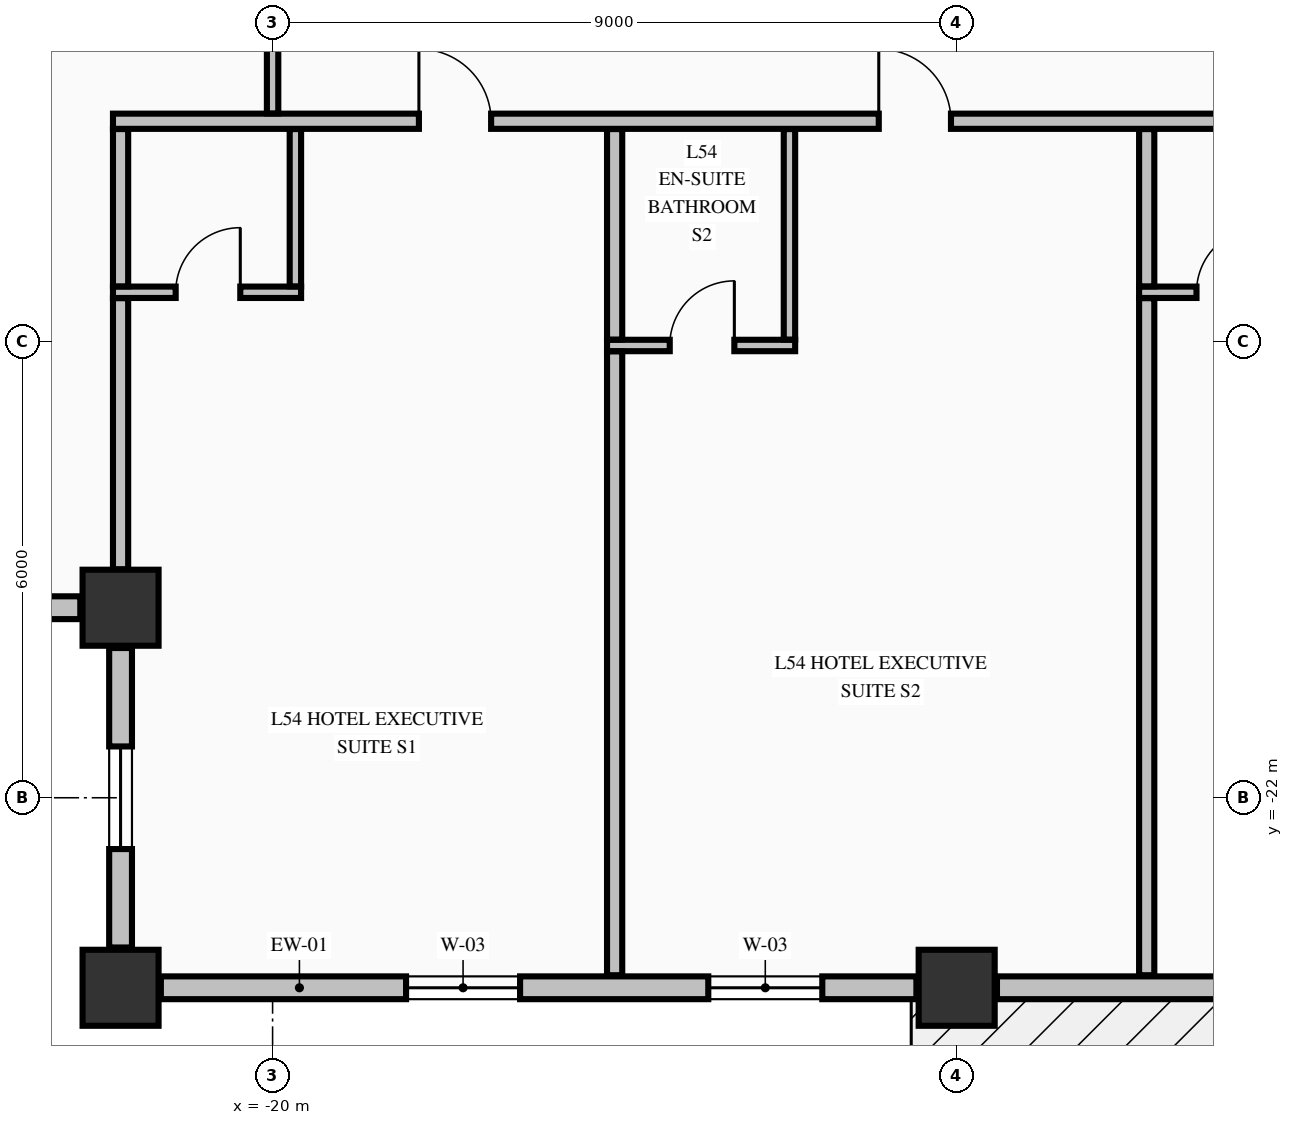
"""IFC4 building model, lengths in metres.
Left out: names, types, materials, properties, quantities, classifications, styles, units other than length and angle.
Written with IfcOpenShell. Run it as: python <this file> out.ifc"""

import sys

from ifc_helpers import new_model, si_unit, direction, frame, frame_2d, origin, origin_2d, place, context, subcontext, project, spatial, rectangle, extrude, element, fill, save


model = new_model("IFC4")
c1 = context("Model", 3, precision=1e-05, world=origin(), true_north=direction((0.0, 1.0)))
c2 = subcontext(c1, "Body", "Model", "MODEL_VIEW")
j1 = project(units=[si_unit("LENGTHUNIT", "METRE"), si_unit("PLANEANGLEUNIT", "RADIAN")], contexts=[c1])
p1 = place(None, origin())
s1 = spatial("IfcSite", under=j1, at=p1, CompositionType="ELEMENT")
p2 = place(p1, origin())
s2 = spatial("IfcBuilding", under=s1, at=p2, CompositionType="ELEMENT")
p3 = place(p2, frame((0.0, 0.0, 208.46)))
s3 = spatial("IfcBuildingStorey", under=s2, at=p3, CompositionType="ELEMENT", Elevation=208.46)
for number, where, z_axis, x_axis in (
    (1, (-22.0, -24.5, -0.25), (0.0, 0.0, 1.0), (1.0, 0.0, 0.0)),
    (2, (-11.0, -24.5, -0.25), (0.0, 0.0, 1.0), (1.0, 0.0, 0.0)),
    (3, (-22.0, -19.5, -0.25), (0.0, 0.0, 1.0), (1.0, 0.0, 0.0)),
):
    element("IfcColumn", number, at=place(p3, frame(where, z_axis=z_axis, x_axis=x_axis)), inside=s3, PredefinedType="COLUMN", context=c2, shape_type="SweptSolid", body=[
        extrude(rectangle(XDim=1.0, YDim=1.0, at=origin_2d()), origin(), (0.0, 0.0, 1.0), 3.325),
    ])
p4 = place(p3, frame((-26.47, -19.5, 0.0), z_axis=(0.0, 0.0, 1.0), x_axis=(1.0, 0.0, 0.0)))
e4 = element("IfcWall", 4, at=p4, inside=s3, PredefinedType="STANDARD", context=c2, shape_type="SweptSolid", body=[
    extrude(rectangle(XDim=3.94, YDim=0.3, at=frame_2d((1.97, 0.0))), origin(), (0.0, 0.0, 1.0), 2.467),
])
p5 = place(p4, frame((1.295, 0.0, 0.68)))
e5 = element("IfcOpeningElement", 5, at=p5, cuts=e4, PredefinedType="OPENING", context=c2, shape_type="SweptSolid", body=[
    extrude(rectangle(XDim=1.35, YDim=1.42, at=frame_2d((0.675, 0.71))), frame((0.0, 0.16, 0.0), z_axis=(0.0, -1.0, 0.0), x_axis=(1.0, 0.0, 0.0)), (0.0, 0.0, 1.0), 0.32),
])
p6 = place(p3, frame((-22.0, -20.03, 0.0), z_axis=(0.0, 0.0, 1.0), x_axis=(0.0, -1.0, 0.0)))
e6 = element("IfcWall", 6, at=p6, inside=s3, PredefinedType="STANDARD", context=c2, shape_type="SweptSolid", body=[
    extrude(rectangle(XDim=3.94, YDim=0.3, at=frame_2d((1.97, 0.0))), origin(), (0.0, 0.0, 1.0), 2.467),
])
p7 = place(p6, frame((1.295, 0.0, 0.68)))
e7 = element("IfcOpeningElement", 7, at=p7, cuts=e6, PredefinedType="OPENING", context=c2, shape_type="SweptSolid", body=[
    extrude(rectangle(XDim=1.35, YDim=1.42, at=frame_2d((0.675, 0.71))), frame((0.0, 0.16, 0.0), z_axis=(0.0, -1.0, 0.0), x_axis=(1.0, 0.0, 0.0)), (0.0, 0.0, 1.0), 0.32),
])
p8 = place(p3, frame((-21.47, -24.5, 0.0), z_axis=(0.0, 0.0, 1.0), x_axis=(1.0, 0.0, 0.0)))
e8 = element("IfcWall", 8, at=p8, inside=s3, PredefinedType="STANDARD", context=c2, shape_type="SweptSolid", body=[
    extrude(rectangle(XDim=9.94, YDim=0.3, at=frame_2d((4.97, 0.0))), origin(), (0.0, 0.0, 1.0), 2.467),
])
p9 = place(p8, frame((3.226, 0.0, 0.72)))
e9 = element("IfcOpeningElement", 9, at=p9, cuts=e8, PredefinedType="OPENING", context=c2, shape_type="SweptSolid", body=[
    extrude(rectangle(XDim=1.5, YDim=1.6, at=frame_2d((0.75, 0.8))), frame((0.0, 0.16, 0.0), z_axis=(0.0, -1.0, 0.0), x_axis=(1.0, 0.0, 0.0)), (0.0, 0.0, 1.0), 0.32),
])
p10 = place(p8, frame((7.202, 0.0, 0.72)))
e10 = element("IfcOpeningElement", 10, at=p10, cuts=e8, PredefinedType="OPENING", context=c2, shape_type="SweptSolid", body=[
    extrude(rectangle(XDim=1.5, YDim=1.6, at=frame_2d((0.75, 0.8))), frame((0.0, 0.16, 0.0), z_axis=(0.0, -1.0, 0.0), x_axis=(1.0, 0.0, 0.0)), (0.0, 0.0, 1.0), 0.32),
])
p11 = place(p3, frame((-10.47, -24.5, 0.0), z_axis=(0.0, 0.0, 1.0), x_axis=(1.0, 0.0, 0.0)))
e11 = element("IfcWall", 11, at=p11, inside=s3, PredefinedType="STANDARD", context=c2, shape_type="SweptSolid", body=[
    extrude(rectangle(XDim=9.94, YDim=0.3, at=frame_2d((4.97, 0.0))), origin(), (0.0, 0.0, 1.0), 2.467),
])
p12 = place(p11, frame((4.068, 0.0, 0.0)))
e12 = element("IfcOpeningElement", 12, at=p12, cuts=e11, PredefinedType="OPENING", context=c2, shape_type="SweptSolid", body=[
    extrude(rectangle(XDim=1.1, YDim=2.15, at=frame_2d((0.55, 1.075))), frame((0.0, 0.16, 0.0), z_axis=(0.0, -1.0, 0.0), x_axis=(1.0, 0.0, 0.0)), (0.0, 0.0, 1.0), 0.32),
])
p13 = place(p3, frame((-15.6, -16.05, 0.0), z_axis=(0.0, 0.0, 1.0), x_axis=(1.0, 0.0, 0.0)))
e13 = element("IfcWall", 13, at=p13, inside=s3, PredefinedType="PARTITIONING", context=c2, shape_type="SweptSolid", body=[
    extrude(rectangle(XDim=2.475, YDim=0.15, at=frame_2d((1.238, 0.0))), origin(), (0.0, 0.0, 1.0), 3.075),
])
p14 = place(p13, frame((0.825, 0.0, 0.0)))
e14 = element("IfcOpeningElement", 14, at=p14, cuts=e13, PredefinedType="OPENING", context=c2, shape_type="SweptSolid", body=[
    extrude(rectangle(XDim=0.85, YDim=2.1, at=frame_2d((0.425, 1.05))), frame((0.0, 0.085, 0.0), z_axis=(0.0, -1.0, 0.0), x_axis=(1.0, 0.0, 0.0)), (0.0, 0.0, 1.0), 0.17),
])
p15 = place(p3, frame((-22.1, -15.35, 0.0), z_axis=(0.0, 0.0, 1.0), x_axis=(1.0, 0.0, 0.0)))
e15 = element("IfcWall", 15, at=p15, inside=s3, PredefinedType="PARTITIONING", context=c2, shape_type="SweptSolid", body=[
    extrude(rectangle(XDim=2.475, YDim=0.15, at=frame_2d((1.238, 0.0))), origin(), (0.0, 0.0, 1.0), 3.075),
])
p16 = place(p15, frame((0.825, 0.0, 0.0)))
e16 = element("IfcOpeningElement", 16, at=p16, cuts=e15, PredefinedType="OPENING", context=c2, shape_type="SweptSolid", body=[
    extrude(rectangle(XDim=0.85, YDim=2.1, at=frame_2d((0.425, 1.05))), frame((0.0, 0.085, 0.0), z_axis=(0.0, -1.0, 0.0), x_axis=(1.0, 0.0, 0.0)), (0.0, 0.0, 1.0), 0.17),
])
p17 = place(p3, frame((-8.6, -15.35, 0.0), z_axis=(0.0, 0.0, 1.0), x_axis=(1.0, 0.0, 0.0)))
e17 = element("IfcWall", 17, at=p17, inside=s3, PredefinedType="PARTITIONING", context=c2, shape_type="SweptSolid", body=[
    extrude(rectangle(XDim=2.335, YDim=0.15, at=frame_2d((1.167, 0.0))), origin(), (0.0, 0.0, 1.0), 3.075),
])
p18 = place(p17, frame((0.755, 0.0, 0.0)))
e18 = element("IfcOpeningElement", 18, at=p18, cuts=e17, PredefinedType="OPENING", context=c2, shape_type="SweptSolid", body=[
    extrude(rectangle(XDim=0.85, YDim=2.1, at=frame_2d((0.425, 1.05))), frame((0.0, 0.085, 0.0), z_axis=(0.0, -1.0, 0.0), x_axis=(1.0, 0.0, 0.0)), (0.0, 0.0, 1.0), 0.17),
])
p19 = place(p3, frame((-22.1, -13.1, 0.0), z_axis=(0.0, 0.0, 1.0), x_axis=(1.0, 0.0, 0.0)))
e19 = element("IfcWall", 19, at=p19, inside=s3, PredefinedType="PARTITIONING", context=c2, shape_type="SweptSolid", body=[
    extrude(rectangle(XDim=39.2, YDim=0.2, at=frame_2d((19.6, 0.0))), origin(), (0.0, 0.0, 1.0), 3.075),
])
p20 = place(p19, frame((4.025, 0.0, 0.0)))
e20 = element("IfcOpeningElement", 20, at=p20, cuts=e19, PredefinedType="OPENING", context=c2, shape_type="SweptSolid", body=[
    extrude(rectangle(XDim=0.95, YDim=2.15, at=frame_2d((0.475, 1.075))), frame((0.0, 0.11, 0.0), z_axis=(0.0, -1.0, 0.0), x_axis=(1.0, 0.0, 0.0)), (0.0, 0.0, 1.0), 0.22),
])
p21 = place(p19, frame((10.075, 0.0, 0.0)))
e21 = element("IfcOpeningElement", 21, at=p21, cuts=e19, PredefinedType="OPENING", context=c2, shape_type="SweptSolid", body=[
    extrude(rectangle(XDim=0.95, YDim=2.15, at=frame_2d((0.475, 1.075))), frame((0.0, 0.11, 0.0), z_axis=(0.0, -1.0, 0.0), x_axis=(1.0, 0.0, 0.0)), (0.0, 0.0, 1.0), 0.22),
])
p22 = place(p19, frame((16.905, 0.0, 0.0)))
e22 = element("IfcOpeningElement", 22, at=p22, cuts=e19, PredefinedType="OPENING", context=c2, shape_type="SweptSolid", body=[
    extrude(rectangle(XDim=0.95, YDim=2.15, at=frame_2d((0.475, 1.075))), frame((0.0, 0.11, 0.0), z_axis=(0.0, -1.0, 0.0), x_axis=(1.0, 0.0, 0.0)), (0.0, 0.0, 1.0), 0.22),
])
p23 = place(p19, frame((22.475, 0.0, 0.0)))
e23 = element("IfcOpeningElement", 23, at=p23, cuts=e19, PredefinedType="OPENING", context=c2, shape_type="SweptSolid", body=[
    extrude(rectangle(XDim=0.95, YDim=2.15, at=frame_2d((0.475, 1.075))), frame((0.0, 0.11, 0.0), z_axis=(0.0, -1.0, 0.0), x_axis=(1.0, 0.0, 0.0)), (0.0, 0.0, 1.0), 0.22),
])
p24 = place(p19, frame((30.675, 0.0, 0.0)))
e24 = element("IfcOpeningElement", 24, at=p24, cuts=e19, PredefinedType="OPENING", context=c2, shape_type="SweptSolid", body=[
    extrude(rectangle(XDim=0.95, YDim=2.15, at=frame_2d((0.475, 1.075))), frame((0.0, 0.11, 0.0), z_axis=(0.0, -1.0, 0.0), x_axis=(1.0, 0.0, 0.0)), (0.0, 0.0, 1.0), 0.22),
])
p25 = place(p19, frame((36.325, 0.0, 0.0)))
e25 = element("IfcOpeningElement", 25, at=p25, cuts=e19, PredefinedType="OPENING", context=c2, shape_type="SweptSolid", body=[
    extrude(rectangle(XDim=1.05, YDim=2.15, at=frame_2d((0.525, 1.075))), frame((0.0, 0.11, 0.0), z_axis=(0.0, -1.0, 0.0), x_axis=(1.0, 0.0, 0.0)), (0.0, 0.0, 1.0), 0.22),
])
p26 = place(p3, frame((-22.0, -18.994, 0.0), z_axis=(0.0, 0.0, 1.0), x_axis=(0.0, 1.0, 0.0)))
e26 = element("IfcWall", 26, at=p26, inside=s3, PredefinedType="PARTITIONING", context=c2, shape_type="SweptSolid", body=[
    extrude(rectangle(XDim=3.566, YDim=0.2, at=frame_2d((1.783, 0.0))), origin(), (0.0, 0.0, 1.0), 3.075),
])
p27 = place(p3, frame((-22.0, -15.272, 0.0), z_axis=(0.0, 0.0, 1.0), x_axis=(0.0, 1.0, 0.0)))
e27 = element("IfcWall", 27, at=p27, inside=s3, PredefinedType="PARTITIONING", context=c2, shape_type="SweptSolid", body=[
    extrude(rectangle(XDim=2.069, YDim=0.2, at=frame_2d((1.035, 0.0))), origin(), (0.0, 0.0, 1.0), 3.075),
])
p28 = place(p3, frame((-20.0, -12.997, 0.0), z_axis=(0.0, 0.0, 1.0), x_axis=(0.0, 1.0, 0.0)))
e28 = element("IfcWall", 28, at=p28, inside=s3, PredefinedType="PARTITIONING", context=c2, shape_type="SweptSolid", body=[
    extrude(rectangle(XDim=2.616, YDim=0.15, at=frame_2d((1.308, 0.0))), origin(), (0.0, 0.0, 1.0), 2.267),
])
p29 = place(p3, frame((-19.7, -15.272, 0.0), z_axis=(0.0, 0.0, 1.0), x_axis=(0.0, 1.0, 0.0)))
e29 = element("IfcWall", 29, at=p29, inside=s3, PredefinedType="PARTITIONING", context=c2, shape_type="SweptSolid", body=[
    extrude(rectangle(XDim=2.069, YDim=0.15, at=frame_2d((1.035, 0.0))), origin(), (0.0, 0.0, 1.0), 2.267),
])
p30 = place(p3, frame((-15.5, -24.335, 0.0), z_axis=(0.0, 0.0, 1.0), x_axis=(0.0, 1.0, 0.0)))
e30 = element("IfcWall", 30, at=p30, inside=s3, PredefinedType="PARTITIONING", context=c2, shape_type="SweptSolid", body=[
    extrude(rectangle(XDim=8.207, YDim=0.2, at=frame_2d((4.104, 0.0))), origin(), (0.0, 0.0, 1.0), 3.075),
])
p31 = place(p3, frame((-15.5, -15.972, 0.0), z_axis=(0.0, 0.0, 1.0), x_axis=(0.0, 1.0, 0.0)))
e31 = element("IfcWall", 31, at=p31, inside=s3, PredefinedType="PARTITIONING", context=c2, shape_type="SweptSolid", body=[
    extrude(rectangle(XDim=2.769, YDim=0.2, at=frame_2d((1.385, 0.0))), origin(), (0.0, 0.0, 1.0), 3.075),
])
p32 = place(p3, frame((-13.2, -15.972, 0.0), z_axis=(0.0, 0.0, 1.0), x_axis=(0.0, 1.0, 0.0)))
e32 = element("IfcWall", 32, at=p32, inside=s3, PredefinedType="PARTITIONING", context=c2, shape_type="SweptSolid", body=[
    extrude(rectangle(XDim=2.769, YDim=0.15, at=frame_2d((1.385, 0.0))), origin(), (0.0, 0.0, 1.0), 3.075),
])
p33 = place(p3, frame((-8.5, -24.335, 0.0), z_axis=(0.0, 0.0, 1.0), x_axis=(0.0, 1.0, 0.0)))
e33 = element("IfcWall", 33, at=p33, inside=s3, PredefinedType="PARTITIONING", context=c2, shape_type="SweptSolid", body=[
    extrude(rectangle(XDim=8.907, YDim=0.2, at=frame_2d((4.454, 0.0))), origin(), (0.0, 0.0, 1.0), 3.075),
])
p34 = place(p3, frame((-8.5, -15.272, 0.0), z_axis=(0.0, 0.0, 1.0), x_axis=(0.0, 1.0, 0.0)))
e34 = element("IfcWall", 34, at=p34, inside=s3, PredefinedType="PARTITIONING", context=c2, shape_type="SweptSolid", body=[
    extrude(rectangle(XDim=2.069, YDim=0.2, at=frame_2d((1.035, 0.0))), origin(), (0.0, 0.0, 1.0), 3.075),
])
p35 = place(p7, origin())
e35 = element("IfcWindow", 35, at=p35, inside=s3, PartitioningType="SINGLE_PANEL", PredefinedType="WINDOW", context=c2, shape_type="SweptSolid", body=[
    extrude(rectangle(XDim=1.35, YDim=1.42, at=frame_2d((0.675, 0.71))), frame((0.0, 0.03, 0.0), z_axis=(0.0, -1.0, 0.0), x_axis=(1.0, 0.0, 0.0)), (0.0, 0.0, 1.0), 0.06),
])
fill(e7, e35)
p36 = place(p9, origin())
e36 = element("IfcWindow", 36, at=p36, inside=s3, PartitioningType="SINGLE_PANEL", PredefinedType="WINDOW", context=c2, shape_type="SweptSolid", body=[
    extrude(rectangle(XDim=1.5, YDim=1.6, at=frame_2d((0.75, 0.8))), frame((0.0, 0.03, 0.0), z_axis=(0.0, -1.0, 0.0), x_axis=(1.0, 0.0, 0.0)), (0.0, 0.0, 1.0), 0.06),
])
fill(e9, e36)
p37 = place(p10, origin())
e37 = element("IfcWindow", 37, at=p37, inside=s3, PartitioningType="SINGLE_PANEL", PredefinedType="WINDOW", context=c2, shape_type="SweptSolid", body=[
    extrude(rectangle(XDim=1.5, YDim=1.6, at=frame_2d((0.75, 0.8))), frame((0.0, 0.03, 0.0), z_axis=(0.0, -1.0, 0.0), x_axis=(1.0, 0.0, 0.0)), (0.0, 0.0, 1.0), 0.06),
])
fill(e10, e37)
p38 = place(p20, origin())
e38 = element("IfcDoor", 38, at=p38, inside=s3, OperationType="SINGLE_SWING_LEFT", PredefinedType="DOOR", context=c2, shape_type="SweptSolid", body=[
    extrude(rectangle(XDim=0.95, YDim=2.15, at=frame_2d((0.475, 1.075))), frame((0.0, 0.025, 0.0), z_axis=(0.0, -1.0, 0.0), x_axis=(1.0, 0.0, 0.0)), (0.0, 0.0, 1.0), 0.05),
])
fill(e20, e38)
p39 = place(p16, origin())
e39 = element("IfcDoor", 39, at=p39, inside=s3, OperationType="SINGLE_SWING_RIGHT", PredefinedType="DOOR", context=c2, shape_type="SweptSolid", body=[
    extrude(rectangle(XDim=0.85, YDim=2.1, at=frame_2d((0.425, 1.05))), frame((0.0, 0.025, 0.0), z_axis=(0.0, -1.0, 0.0), x_axis=(1.0, 0.0, 0.0)), (0.0, 0.0, 1.0), 0.05),
])
fill(e16, e39)
p40 = place(p21, origin())
e40 = element("IfcDoor", 40, at=p40, inside=s3, OperationType="SINGLE_SWING_LEFT", PredefinedType="DOOR", context=c2, shape_type="SweptSolid", body=[
    extrude(rectangle(XDim=0.95, YDim=2.15, at=frame_2d((0.475, 1.075))), frame((0.0, 0.025, 0.0), z_axis=(0.0, -1.0, 0.0), x_axis=(1.0, 0.0, 0.0)), (0.0, 0.0, 1.0), 0.05),
])
fill(e21, e40)
p41 = place(p14, origin())
e41 = element("IfcDoor", 41, at=p41, inside=s3, OperationType="SINGLE_SWING_RIGHT", PredefinedType="DOOR", context=c2, shape_type="SweptSolid", body=[
    extrude(rectangle(XDim=0.85, YDim=2.1, at=frame_2d((0.425, 1.05))), frame((0.0, 0.025, 0.0), z_axis=(0.0, -1.0, 0.0), x_axis=(1.0, 0.0, 0.0)), (0.0, 0.0, 1.0), 0.05),
])
fill(e14, e41)
p42 = place(p18, origin())
e42 = element("IfcDoor", 42, at=p42, inside=s3, OperationType="SINGLE_SWING_RIGHT", PredefinedType="DOOR", context=c2, shape_type="SweptSolid", body=[
    extrude(rectangle(XDim=0.85, YDim=2.1, at=frame_2d((0.425, 1.05))), frame((0.0, 0.025, 0.0), z_axis=(0.0, -1.0, 0.0), x_axis=(1.0, 0.0, 0.0)), (0.0, 0.0, 1.0), 0.05),
])
fill(e18, e42)
save(model, sys.argv[1])
